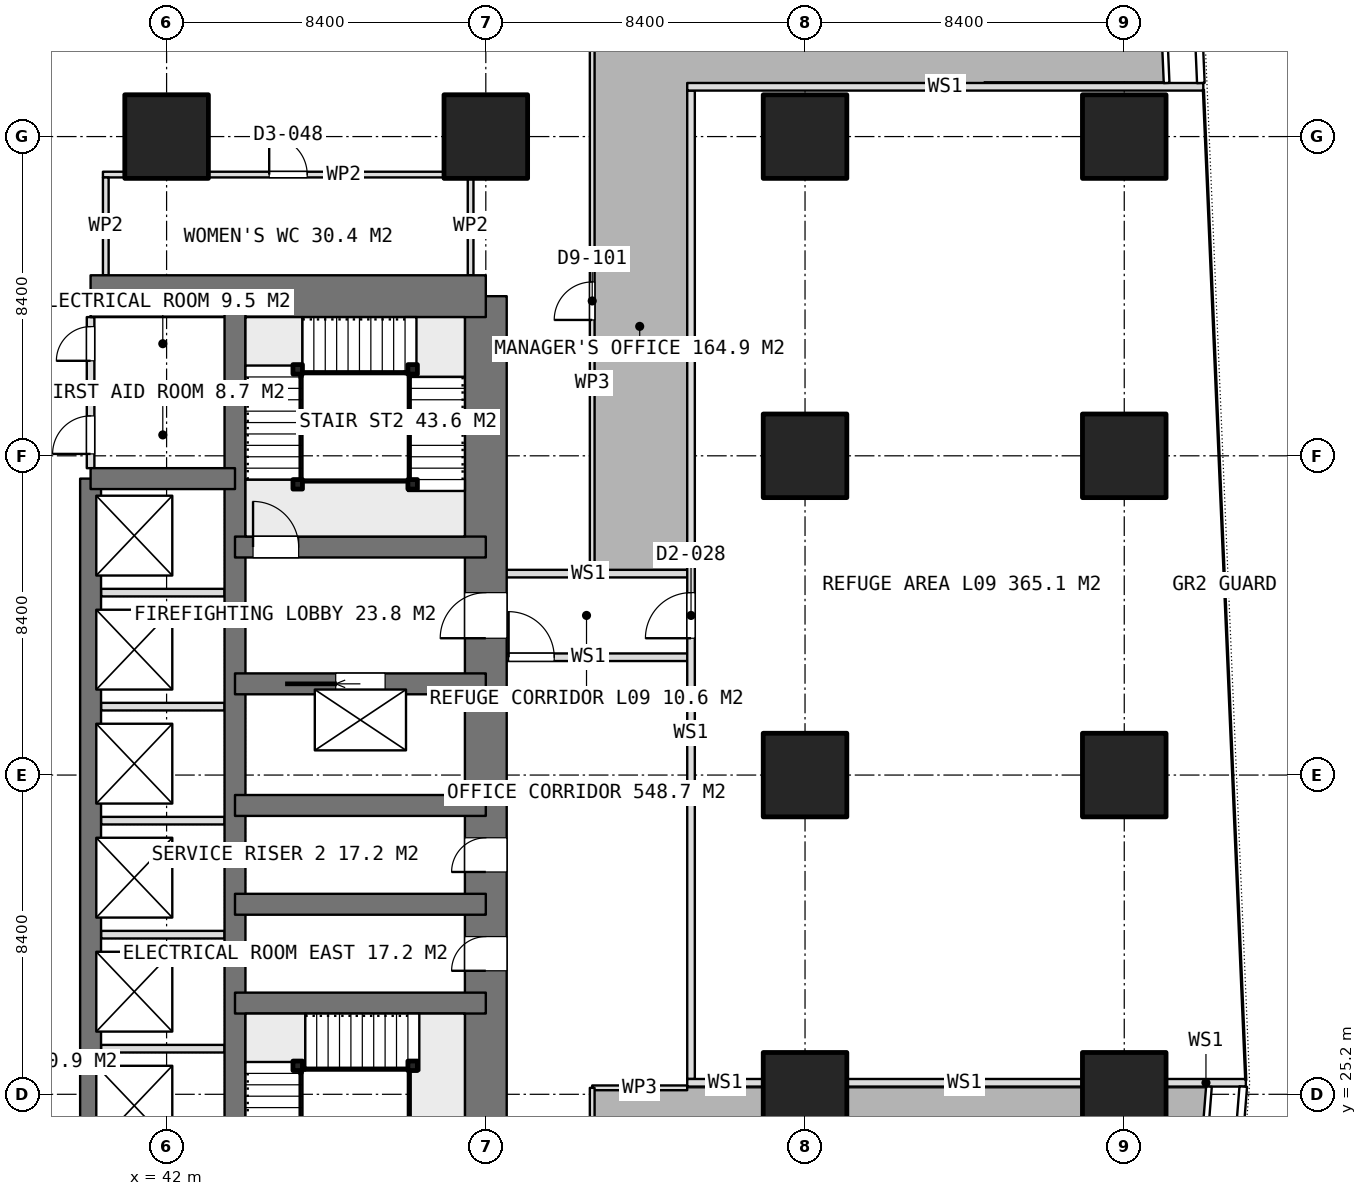
"""IFC4 building model, lengths in metres.
Left out: names, types, materials, properties, quantities, classifications, styles, units other than length and angle.
Written with IfcOpenShell. Run it as: python <this file> out.ifc"""

import sys

from ifc_helpers import new_model, si_unit, direction, frame, frame_2d, origin, origin_2d, place, context, subcontext, project, spatial, rectangle, extrude, element, fill, save


model = new_model("IFC4")
c1 = context("Model", 3, precision=1e-05, world=origin(), true_north=direction((0.0, 1.0)))
c2 = subcontext(c1, "Body", "Model", "MODEL_VIEW")
j1 = project(units=[si_unit("LENGTHUNIT", "METRE"), si_unit("PLANEANGLEUNIT", "RADIAN")], contexts=[c1])
p1 = place(None, origin())
s1 = spatial("IfcSite", under=j1, at=p1, CompositionType="ELEMENT")
p2 = place(p1, origin())
s2 = spatial("IfcBuilding", under=s1, at=p2, CompositionType="ELEMENT")
p3 = place(p2, frame((0.0, 0.0, 40.4)))
s3 = spatial("IfcBuildingStorey", under=s2, at=p3, CompositionType="ELEMENT", Elevation=40.4)
p4 = place(p3, frame((40.0, 46.2, 0.0), z_axis=(0.0, 0.0, 1.0), x_axis=(1.0, 0.0, 0.0)))
e1 = element("IfcWall", 1, at=p4, inside=s3, PredefinedType="SHEAR", context=c2, shape_type="SweptSolid", body=[
    extrude(rectangle(XDim=10.4, YDim=1.1, at=frame_2d((5.2, 0.0))), origin(), (0.0, 0.0, 1.0), 3.75),
])
p5 = place(p3, frame((50.4, 21.0, 0.0), z_axis=(0.0, 0.0, 1.0), x_axis=(0.0, 1.0, 0.0)))
e2 = element("IfcWall", 2, at=p5, inside=s3, PredefinedType="SHEAR", context=c2, shape_type="SweptSolid", body=[
    extrude(rectangle(XDim=25.2, YDim=1.1, at=frame_2d((12.6, 0.0))), origin(), (0.0, 0.0, 1.0), 3.75),
])
p6 = place(p5, frame((16.2, 0.0, 0.0)))
e3 = element("IfcOpeningElement", 3, at=p6, cuts=e2, PredefinedType="OPENING", context=c2, shape_type="SweptSolid", body=[
    extrude(rectangle(XDim=1.2, YDim=2.1, at=frame_2d((0.6, 1.05))), frame((0.0, 0.56, 0.0), z_axis=(0.0, -1.0, 0.0), x_axis=(1.0, 0.0, 0.0)), (0.0, 0.0, 1.0), 1.12),
])
p7 = place(p5, frame((10.05, 0.0, 0.0)))
e4 = element("IfcOpeningElement", 4, at=p7, cuts=e2, PredefinedType="OPENING", context=c2, shape_type="SweptSolid", body=[
    extrude(rectangle(XDim=0.9, YDim=2.1, at=frame_2d((0.45, 1.05))), frame((0.0, 0.56, 0.0), z_axis=(0.0, -1.0, 0.0), x_axis=(1.0, 0.0, 0.0)), (0.0, 0.0, 1.0), 1.12),
])
p8 = place(p5, frame((7.45, 0.0, 0.0)))
e5 = element("IfcOpeningElement", 5, at=p8, cuts=e2, PredefinedType="OPENING", context=c2, shape_type="SweptSolid", body=[
    extrude(rectangle(XDim=0.9, YDim=2.1, at=frame_2d((0.45, 1.05))), frame((0.0, 0.56, 0.0), z_axis=(0.0, -1.0, 0.0), x_axis=(1.0, 0.0, 0.0)), (0.0, 0.0, 1.0), 1.12),
])
p9 = place(p5, frame((0.75, 0.0, 0.0)))
e6 = element("IfcOpeningElement", 6, at=p9, cuts=e2, PredefinedType="OPENING", context=c2, shape_type="SweptSolid", body=[
    extrude(rectangle(XDim=1.2, YDim=2.1, at=frame_2d((0.6, 1.05))), frame((0.0, 0.56, 0.0), z_axis=(0.0, -1.0, 0.0), x_axis=(1.0, 0.0, 0.0)), (0.0, 0.0, 1.0), 1.12),
])
p10 = place(p3, frame((43.8, 21.0, 0.0), z_axis=(0.0, 0.0, 1.0), x_axis=(0.0, 1.0, 0.0)))
e7 = element("IfcWall", 7, at=p10, inside=s3, PredefinedType="SHEAR", context=c2, shape_type="SweptSolid", body=[
    extrude(rectangle(XDim=25.2, YDim=0.55, at=frame_2d((12.6, 0.0))), origin(), (0.0, 0.0, 1.0), 3.75),
])
p11 = place(p3, frame((40.0, 23.4, 0.0), z_axis=(0.0, 0.0, 1.0), x_axis=(0.0, 1.0, 0.0)))
e8 = element("IfcWall", 8, at=p11, inside=s3, PredefinedType="SHEAR", context=c2, shape_type="SweptSolid", body=[
    extrude(rectangle(XDim=18.0, YDim=0.55, at=frame_2d((9.0, 0.0))), origin(), (0.0, 0.0, 1.0), 3.75),
])
p12 = place(p3, frame((40.0, 41.4, 0.0), z_axis=(0.0, 0.0, 1.0), x_axis=(1.0, 0.0, 0.0)))
e9 = element("IfcWall", 9, at=p12, inside=s3, PredefinedType="SHEAR", context=c2, shape_type="SweptSolid", body=[
    extrude(rectangle(XDim=3.8, YDim=0.55, at=frame_2d((1.9, 0.0))), origin(), (0.0, 0.0, 1.0), 3.75),
])
for number, where, z_axis, x_axis in (
    (10, (43.8, 27.6, 0.0), (0.0, 0.0, 1.0), (1.0, 0.0, 0.0)),
    (11, (43.8, 30.2, 0.0), (0.0, 0.0, 1.0), (1.0, 0.0, 0.0)),
    (12, (43.8, 32.8, 0.0), (0.0, 0.0, 1.0), (1.0, 0.0, 0.0)),
):
    element("IfcWall", number, at=place(p3, frame(where, z_axis=z_axis, x_axis=x_axis)), inside=s3, PredefinedType="SHEAR", context=c2, shape_type="SweptSolid", body=[
        extrude(rectangle(XDim=6.6, YDim=0.55, at=frame_2d((3.3, 0.0))), origin(), (0.0, 0.0, 1.0), 3.75),
    ])
p13 = place(p3, frame((43.8, 36.0, 0.0), z_axis=(0.0, 0.0, 1.0), x_axis=(1.0, 0.0, 0.0)))
e13 = element("IfcWall", 13, at=p13, inside=s3, PredefinedType="SHEAR", context=c2, shape_type="SweptSolid", body=[
    extrude(rectangle(XDim=6.6, YDim=0.55, at=frame_2d((3.3, 0.0))), origin(), (0.0, 0.0, 1.0), 3.75),
])
p14 = place(p13, frame((2.65, 0.0, 0.0)))
e14 = element("IfcOpeningElement", 14, at=p14, cuts=e13, PredefinedType="OPENING", context=c2, shape_type="SweptSolid", body=[
    extrude(rectangle(XDim=1.3, YDim=2.1, at=frame_2d((0.65, 1.05))), frame((0.0, 0.285, 0.0), z_axis=(0.0, -1.0, 0.0), x_axis=(1.0, 0.0, 0.0)), (0.0, 0.0, 1.0), 0.57),
])
p15 = place(p3, frame((43.8, 39.6, 0.0), z_axis=(0.0, 0.0, 1.0), x_axis=(1.0, 0.0, 0.0)))
e15 = element("IfcWall", 15, at=p15, inside=s3, PredefinedType="SHEAR", context=c2, shape_type="SweptSolid", body=[
    extrude(rectangle(XDim=6.6, YDim=0.55, at=frame_2d((3.3, 0.0))), origin(), (0.0, 0.0, 1.0), 3.75),
])
p16 = place(p15, frame((0.475, 0.0, 0.0)))
e16 = element("IfcOpeningElement", 16, at=p16, cuts=e15, PredefinedType="OPENING", context=c2, shape_type="SweptSolid", body=[
    extrude(rectangle(XDim=1.2, YDim=2.1, at=frame_2d((0.6, 1.05))), frame((0.0, 0.285, 0.0), z_axis=(0.0, -1.0, 0.0), x_axis=(1.0, 0.0, 0.0)), (0.0, 0.0, 1.0), 0.57),
])
for number, where, z_axis, x_axis in (
    (17, (42.0, 50.4, 0.0), (0.0, 0.0, 1.0), (1.0, 0.0, 0.0)),
    (18, (50.4, 50.4, 0.0), (0.0, 0.0, 1.0), (1.0, 0.0, 0.0)),
    (19, (58.8, 25.2, 0.0), (0.0, 0.0, 1.0), (1.0, 0.0, 0.0)),
    (20, (58.8, 33.6, 0.0), (0.0, 0.0, 1.0), (1.0, 0.0, 0.0)),
    (21, (58.8, 42.0, 0.0), (0.0, 0.0, 1.0), (1.0, 0.0, 0.0)),
    (22, (58.8, 50.4, 0.0), (0.0, 0.0, 1.0), (1.0, 0.0, 0.0)),
    (23, (67.2, 25.2, 0.0), (0.0, 0.0, 1.0), (1.0, 0.0, 0.0)),
    (24, (67.2, 33.6, 0.0), (0.0, 0.0, 1.0), (1.0, 0.0, 0.0)),
    (25, (67.2, 42.0, 0.0), (0.0, 0.0, 1.0), (1.0, 0.0, 0.0)),
    (26, (67.2, 50.4, 0.0), (0.0, 0.0, 1.0), (1.0, 0.0, 0.0)),
):
    element("IfcColumn", number, at=place(p3, frame(where, z_axis=z_axis, x_axis=x_axis)), inside=s3, PredefinedType="COLUMN", context=c2, shape_type="SweptSolid", body=[
        extrude(rectangle(XDim=2.2, YDim=2.2, at=origin_2d()), origin(), (0.0, 0.0, 1.0), 3.75),
    ])
for number, where, z_axis, x_axis in (
    (27, (40.275, 26.4, 0.0), (0.0, 0.0, 1.0), (1.0, 0.0, 0.0)),
    (28, (40.275, 29.4, 0.0), (0.0, 0.0, 1.0), (1.0, 0.0, 0.0)),
    (29, (40.275, 32.4, 0.0), (0.0, 0.0, 1.0), (1.0, 0.0, 0.0)),
    (30, (40.275, 35.4, 0.0), (0.0, 0.0, 1.0), (1.0, 0.0, 0.0)),
    (31, (40.275, 38.4, 0.0), (0.0, 0.0, 1.0), (1.0, 0.0, 0.0)),
):
    element("IfcWall", number, at=place(p3, frame(where, z_axis=z_axis, x_axis=x_axis)), inside=s3, PredefinedType="PARTITIONING", context=c2, shape_type="SweptSolid", body=[
        extrude(rectangle(XDim=3.25, YDim=0.2, at=frame_2d((1.625, 0.0))), origin(), (0.0, 0.0, 1.0), 3.5),
    ])
p17 = place(p3, frame((40.0, 41.675, 0.0), z_axis=(0.0, 0.0, 1.0), x_axis=(0.0, 1.0, 0.0)))
e32 = element("IfcWall", 32, at=p17, inside=s3, PredefinedType="PARTITIONING", context=c2, shape_type="SweptSolid", body=[
    extrude(rectangle(XDim=3.975, YDim=0.2, at=frame_2d((1.987, 0.0))), origin(), (0.0, 0.0, 1.0), 3.5),
])
p18 = place(p17, frame((2.825, 0.0, 0.0)))
e33 = element("IfcOpeningElement", 33, at=p18, cuts=e32, PredefinedType="OPENING", context=c2, shape_type="SweptSolid", body=[
    extrude(rectangle(XDim=0.9, YDim=2.1, at=frame_2d((0.45, 1.05))), frame((0.0, 0.11, 0.0), z_axis=(0.0, -1.0, 0.0), x_axis=(1.0, 0.0, 0.0)), (0.0, 0.0, 1.0), 0.22),
])
p19 = place(p17, frame((0.375, 0.0, 0.0)))
e34 = element("IfcOpeningElement", 34, at=p19, cuts=e32, PredefinedType="OPENING", context=c2, shape_type="SweptSolid", body=[
    extrude(rectangle(XDim=1.0, YDim=2.1, at=frame_2d((0.5, 1.05))), frame((0.0, 0.11, 0.0), z_axis=(0.0, -1.0, 0.0), x_axis=(1.0, 0.0, 0.0)), (0.0, 0.0, 1.0), 0.22),
])
p20 = place(p3, frame((40.0, 43.7, 0.0), z_axis=(0.0, 0.0, 1.0), x_axis=(1.0, 0.0, 0.0)))
e35 = element("IfcWall", 35, at=p20, inside=s3, PredefinedType="PARTITIONING", context=c2, shape_type="SweptSolid", body=[
    extrude(rectangle(XDim=3.525, YDim=0.2, at=frame_2d((1.762, 0.0))), origin(), (0.0, 0.0, 1.0), 3.5),
])
p21 = place(p3, frame((40.325, 49.4, 0.0), z_axis=(0.0, 0.0, 1.0), x_axis=(1.0, 0.0, 0.0)))
e36 = element("IfcWall", 36, at=p21, inside=s3, PredefinedType="PARTITIONING", context=c2, shape_type="SweptSolid", body=[
    extrude(rectangle(XDim=9.75, YDim=0.15, at=frame_2d((4.875, 0.0))), origin(), (0.0, 0.0, 1.0), 3.5),
])
p22 = place(p21, frame((4.375, 0.0, 0.0)))
e37 = element("IfcOpeningElement", 37, at=p22, cuts=e36, PredefinedType="OPENING", context=c2, shape_type="SweptSolid", body=[
    extrude(rectangle(XDim=1.0, YDim=2.1, at=frame_2d((0.5, 1.05))), frame((0.0, 0.085, 0.0), z_axis=(0.0, -1.0, 0.0), x_axis=(1.0, 0.0, 0.0)), (0.0, 0.0, 1.0), 0.17),
])
for number, where, z_axis, x_axis in (
    (38, (40.4, 46.75, 0.0), (0.0, 0.0, 1.0), (0.0, 1.0, 0.0)),
    (39, (50.0, 46.75, 0.0), (0.0, 0.0, 1.0), (0.0, 1.0, 0.0)),
):
    element("IfcWall", number, at=place(p3, frame(where, z_axis=z_axis, x_axis=x_axis)), inside=s3, PredefinedType="PARTITIONING", context=c2, shape_type="SweptSolid", body=[
        extrude(rectangle(XDim=2.575, YDim=0.15, at=frame_2d((1.288, 0.0))), origin(), (0.0, 0.0, 1.0), 3.5),
    ])
p23 = place(p3, frame((53.2, 21.202, 0.0), z_axis=(0.0, 0.0, 1.0), x_axis=(0.0, 1.0, 0.0)))
e40 = element("IfcWall", 40, at=p23, inside=s3, PredefinedType="PARTITIONING", context=c2, shape_type="SweptSolid", body=[
    extrude(rectangle(XDim=4.168, YDim=0.125, at=frame_2d((2.084, 0.0))), origin(), (0.0, 0.0, 1.0), 3.5),
])
p24 = place(p3, frame((53.2, 25.37, 0.0), z_axis=(0.0, 0.0, 1.0), x_axis=(1.0, 0.0, 0.0)))
e41 = element("IfcWall", 41, at=p24, inside=s3, PredefinedType="PARTITIONING", context=c2, shape_type="SweptSolid", body=[
    extrude(rectangle(XDim=2.499, YDim=0.125, at=frame_2d((1.25, 0.0))), origin(), (0.0, 0.0, 1.0), 3.5),
])
p25 = place(p3, frame((53.2, 39.011, 0.0), z_axis=(0.0, 0.0, 1.0), x_axis=(0.0, 1.0, 0.0)))
e42 = element("IfcWall", 42, at=p25, inside=s3, PredefinedType="PARTITIONING", context=c2, shape_type="SweptSolid", body=[
    extrude(rectangle(XDim=13.989, YDim=0.125, at=frame_2d((6.995, 0.0))), origin(), (0.0, 0.0, 1.0), 3.5),
])
p26 = place(p25, frame((6.564, 0.0, 0.0)))
e43 = element("IfcOpeningElement", 43, at=p26, cuts=e42, PredefinedType="OPENING", context=c2, shape_type="SweptSolid", body=[
    extrude(rectangle(XDim=1.0, YDim=2.1, at=frame_2d((0.5, 1.05))), frame((0.0, 0.073, 0.0), z_axis=(0.0, -1.0, 0.0), x_axis=(1.0, 0.0, 0.0)), (0.0, 0.0, 1.0), 0.145),
])
for number, where, z_axis, x_axis in (
    (44, (45.45, 41.25, 0.0), (0.0, 0.0, 1.0), (1.0, 0.0, 0.0)),
    (45, (45.45, 44.275, 0.0), (0.0, 0.0, 1.0), (1.0, 0.0, 0.0)),
    (46, (48.475, 44.275, 0.0), (0.0, 0.0, 1.0), (1.0, 0.0, 0.0)),
    (47, (48.475, 41.25, 0.0), (0.0, 0.0, 1.0), (1.0, 0.0, 0.0)),
    (48, (45.45, 25.95, 0.0), (0.0, 0.0, 1.0), (1.0, 0.0, 0.0)),
    (49, (48.475, 25.95, 0.0), (0.0, 0.0, 1.0), (1.0, 0.0, 0.0)),
):
    element("IfcColumn", number, at=place(p3, frame(where, z_axis=z_axis, x_axis=x_axis)), inside=s3, PredefinedType="COLUMN", context=c2, shape_type="SweptSolid", body=[
        extrude(rectangle(XDim=0.25, YDim=0.25, at=origin_2d()), origin(), (0.0, 0.0, 1.0), 3.75),
    ])
p27 = place(p3, frame((55.8, 25.603, 0.0), z_axis=(0.0, 0.0, 1.0), x_axis=(0.0, 1.0, 0.0)))
e50 = element("IfcWall", 50, at=p27, inside=s3, PredefinedType="PARTITIONING", context=c2, shape_type="SweptSolid", body=[
    extrude(rectangle(XDim=26.007, YDim=0.2, at=frame_2d((13.003, 0.0))), origin(), (0.0, 0.0, 1.0), 3.5),
])
p28 = place(p27, frame((11.597, 0.0, 0.0)))
e51 = element("IfcOpeningElement", 51, at=p28, cuts=e50, PredefinedType="OPENING", context=c2, shape_type="SweptSolid", body=[
    extrude(rectangle(XDim=1.2, YDim=2.1, at=frame_2d((0.6, 1.05))), frame((0.0, 0.11, 0.0), z_axis=(0.0, -1.0, 0.0), x_axis=(1.0, 0.0, 0.0)), (0.0, 0.0, 1.0), 0.22),
])
p29 = place(p3, frame((55.7, 25.503, 0.0), z_axis=(0.0, 0.0, 1.0), x_axis=(1.0, 0.0, 0.0)))
e52 = element("IfcWall", 52, at=p29, inside=s3, PredefinedType="PARTITIONING", context=c2, shape_type="SweptSolid", body=[
    extrude(rectangle(XDim=2.0, YDim=0.2, at=frame_2d((1.0, 0.0))), origin(), (0.0, 0.0, 1.0), 3.5),
])
p30 = place(p3, frame((59.9, 25.503, 0.0), z_axis=(0.0, 0.0, 1.0), x_axis=(1.0, 0.0, 0.0)))
e53 = element("IfcWall", 53, at=p30, inside=s3, PredefinedType="PARTITIONING", context=c2, shape_type="SweptSolid", body=[
    extrude(rectangle(XDim=6.2, YDim=0.2, at=frame_2d((3.1, 0.0))), origin(), (0.0, 0.0, 1.0), 3.5),
])
p31 = place(p3, frame((68.3, 25.503, 0.0), z_axis=(0.0, 0.0, 1.0), x_axis=(1.0, 0.0, 0.0)))
e54 = element("IfcWall", 54, at=p31, inside=s3, PredefinedType="PARTITIONING", context=c2, shape_type="SweptSolid", body=[
    extrude(rectangle(XDim=2.1, YDim=0.2, at=frame_2d((1.05, 0.0))), origin(), (0.0, 0.0, 1.0), 3.5),
])
p32 = place(p3, frame((55.7, 51.71, 0.0), z_axis=(0.0, 0.0, 1.0), x_axis=(1.0, 0.0, 0.0)))
e55 = element("IfcWall", 55, at=p32, inside=s3, PredefinedType="PARTITIONING", context=c2, shape_type="SweptSolid", body=[
    extrude(rectangle(XDim=13.58, YDim=0.2, at=frame_2d((6.79, 0.0))), origin(), (0.0, 0.0, 1.0), 3.5),
])
p33 = place(p3, frame((50.4, 38.9, 0.0), z_axis=(0.0, 0.0, 1.0), x_axis=(1.0, 0.0, 0.0)))
e56 = element("IfcWall", 56, at=p33, inside=s3, PredefinedType="PARTITIONING", context=c2, shape_type="SweptSolid", body=[
    extrude(rectangle(XDim=5.4, YDim=0.2, at=frame_2d((2.7, 0.0))), origin(), (0.0, 0.0, 1.0), 3.5),
])
p34 = place(p3, frame((50.4, 36.7, 0.0), z_axis=(0.0, 0.0, 1.0), x_axis=(1.0, 0.0, 0.0)))
e57 = element("IfcWall", 57, at=p34, inside=s3, PredefinedType="PARTITIONING", context=c2, shape_type="SweptSolid", body=[
    extrude(rectangle(XDim=5.4, YDim=0.2, at=frame_2d((2.7, 0.0))), origin(), (0.0, 0.0, 1.0), 3.5),
])
p35 = place(p34, frame((0.6, 0.0, 0.0)))
e58 = element("IfcOpeningElement", 58, at=p35, cuts=e57, PredefinedType="OPENING", context=c2, shape_type="SweptSolid", body=[
    extrude(rectangle(XDim=1.2, YDim=2.1, at=frame_2d((0.6, 1.05))), frame((0.0, 0.11, 0.0), z_axis=(0.0, -1.0, 0.0), x_axis=(1.0, 0.0, 0.0)), (0.0, 0.0, 1.0), 0.22),
])
p36 = place(p6, origin())
e59 = element("IfcDoor", 59, at=p36, inside=s3, OperationType="SINGLE_SWING_LEFT", PredefinedType="DOOR", context=c2, shape_type="SweptSolid", body=[
    extrude(rectangle(XDim=1.2, YDim=2.1, at=frame_2d((0.6, 1.05))), frame((0.0, 0.025, 0.0), z_axis=(0.0, -1.0, 0.0), x_axis=(1.0, 0.0, 0.0)), (0.0, 0.0, 1.0), 0.05),
])
fill(e3, e59)
p37 = place(p7, origin())
e60 = element("IfcDoor", 60, at=p37, inside=s3, OperationType="SINGLE_SWING_LEFT", PredefinedType="DOOR", context=c2, shape_type="SweptSolid", body=[
    extrude(rectangle(XDim=0.9, YDim=2.1, at=frame_2d((0.45, 1.05))), frame((0.0, 0.025, 0.0), z_axis=(0.0, -1.0, 0.0), x_axis=(1.0, 0.0, 0.0)), (0.0, 0.0, 1.0), 0.05),
])
fill(e4, e60)
p38 = place(p8, origin())
e61 = element("IfcDoor", 61, at=p38, inside=s3, OperationType="SINGLE_SWING_LEFT", PredefinedType="DOOR", context=c2, shape_type="SweptSolid", body=[
    extrude(rectangle(XDim=0.9, YDim=2.1, at=frame_2d((0.45, 1.05))), frame((0.0, 0.025, 0.0), z_axis=(0.0, -1.0, 0.0), x_axis=(1.0, 0.0, 0.0)), (0.0, 0.0, 1.0), 0.05),
])
fill(e5, e61)
p39 = place(p18, origin())
e62 = element("IfcDoor", 62, at=p39, inside=s3, OperationType="SINGLE_SWING_LEFT", PredefinedType="DOOR", context=c2, shape_type="SweptSolid", body=[
    extrude(rectangle(XDim=0.9, YDim=2.1, at=frame_2d((0.45, 1.05))), frame((0.0, 0.025, 0.0), z_axis=(0.0, -1.0, 0.0), x_axis=(1.0, 0.0, 0.0)), (0.0, 0.0, 1.0), 0.05),
])
fill(e33, e62)
p40 = place(p19, origin())
e63 = element("IfcDoor", 63, at=p40, inside=s3, OperationType="SINGLE_SWING_LEFT", PredefinedType="DOOR", context=c2, shape_type="SweptSolid", body=[
    extrude(rectangle(XDim=1.0, YDim=2.1, at=frame_2d((0.5, 1.05))), frame((0.0, 0.025, 0.0), z_axis=(0.0, -1.0, 0.0), x_axis=(1.0, 0.0, 0.0)), (0.0, 0.0, 1.0), 0.05),
])
fill(e34, e63)
p41 = place(p14, origin())
e64 = element("IfcDoor", 64, at=p41, inside=s3, OperationType="SLIDING_TO_LEFT", PredefinedType="USERDEFINED", context=c2, shape_type="SweptSolid", body=[
    extrude(rectangle(XDim=1.3, YDim=2.1, at=frame_2d((0.65, 1.05))), frame((0.0, 0.025, 0.0), z_axis=(0.0, -1.0, 0.0), x_axis=(1.0, 0.0, 0.0)), (0.0, 0.0, 1.0), 0.05),
])
fill(e14, e64)
p42 = place(p22, origin())
e65 = element("IfcDoor", 65, at=p42, inside=s3, OperationType="SINGLE_SWING_LEFT", PredefinedType="DOOR", context=c2, shape_type="SweptSolid", body=[
    extrude(rectangle(XDim=1.0, YDim=2.1, at=frame_2d((0.5, 1.05))), frame((0.0, 0.025, 0.0), z_axis=(0.0, -1.0, 0.0), x_axis=(1.0, 0.0, 0.0)), (0.0, 0.0, 1.0), 0.05),
])
fill(e37, e65)
p43 = place(p26, origin())
e66 = element("IfcDoor", 66, at=p43, inside=s3, OperationType="SINGLE_SWING_LEFT", PredefinedType="DOOR", context=c2, shape_type="SweptSolid", body=[
    extrude(rectangle(XDim=1.0, YDim=2.1, at=frame_2d((0.5, 1.05))), frame((0.0, 0.025, 0.0), z_axis=(0.0, -1.0, 0.0), x_axis=(1.0, 0.0, 0.0)), (0.0, 0.0, 1.0), 0.05),
])
fill(e43, e66)
p44 = place(p16, origin())
e67 = element("IfcDoor", 67, at=p44, inside=s3, OperationType="SINGLE_SWING_RIGHT", PredefinedType="DOOR", context=c2, shape_type="SweptSolid", body=[
    extrude(rectangle(XDim=1.2, YDim=2.1, at=frame_2d((0.6, 1.05))), frame((0.0, 0.025, 0.0), z_axis=(0.0, -1.0, 0.0), x_axis=(1.0, 0.0, 0.0)), (0.0, 0.0, 1.0), 0.05),
])
fill(e16, e67)
p45 = place(p28, origin())
e68 = element("IfcDoor", 68, at=p45, inside=s3, OperationType="SINGLE_SWING_LEFT", PredefinedType="DOOR", context=c2, shape_type="SweptSolid", body=[
    extrude(rectangle(XDim=1.2, YDim=2.1, at=frame_2d((0.6, 1.05))), frame((0.0, 0.025, 0.0), z_axis=(0.0, -1.0, 0.0), x_axis=(1.0, 0.0, 0.0)), (0.0, 0.0, 1.0), 0.05),
])
fill(e51, e68)
p46 = place(p35, origin())
e69 = element("IfcDoor", 69, at=p46, inside=s3, OperationType="SINGLE_SWING_LEFT", PredefinedType="DOOR", context=c2, shape_type="SweptSolid", body=[
    extrude(rectangle(XDim=1.2, YDim=2.1, at=frame_2d((0.6, 1.05))), frame((0.0, 0.025, 0.0), z_axis=(0.0, -1.0, 0.0), x_axis=(1.0, 0.0, 0.0)), (0.0, 0.0, 1.0), 0.05),
])
fill(e58, e69)
save(model, sys.argv[1])
